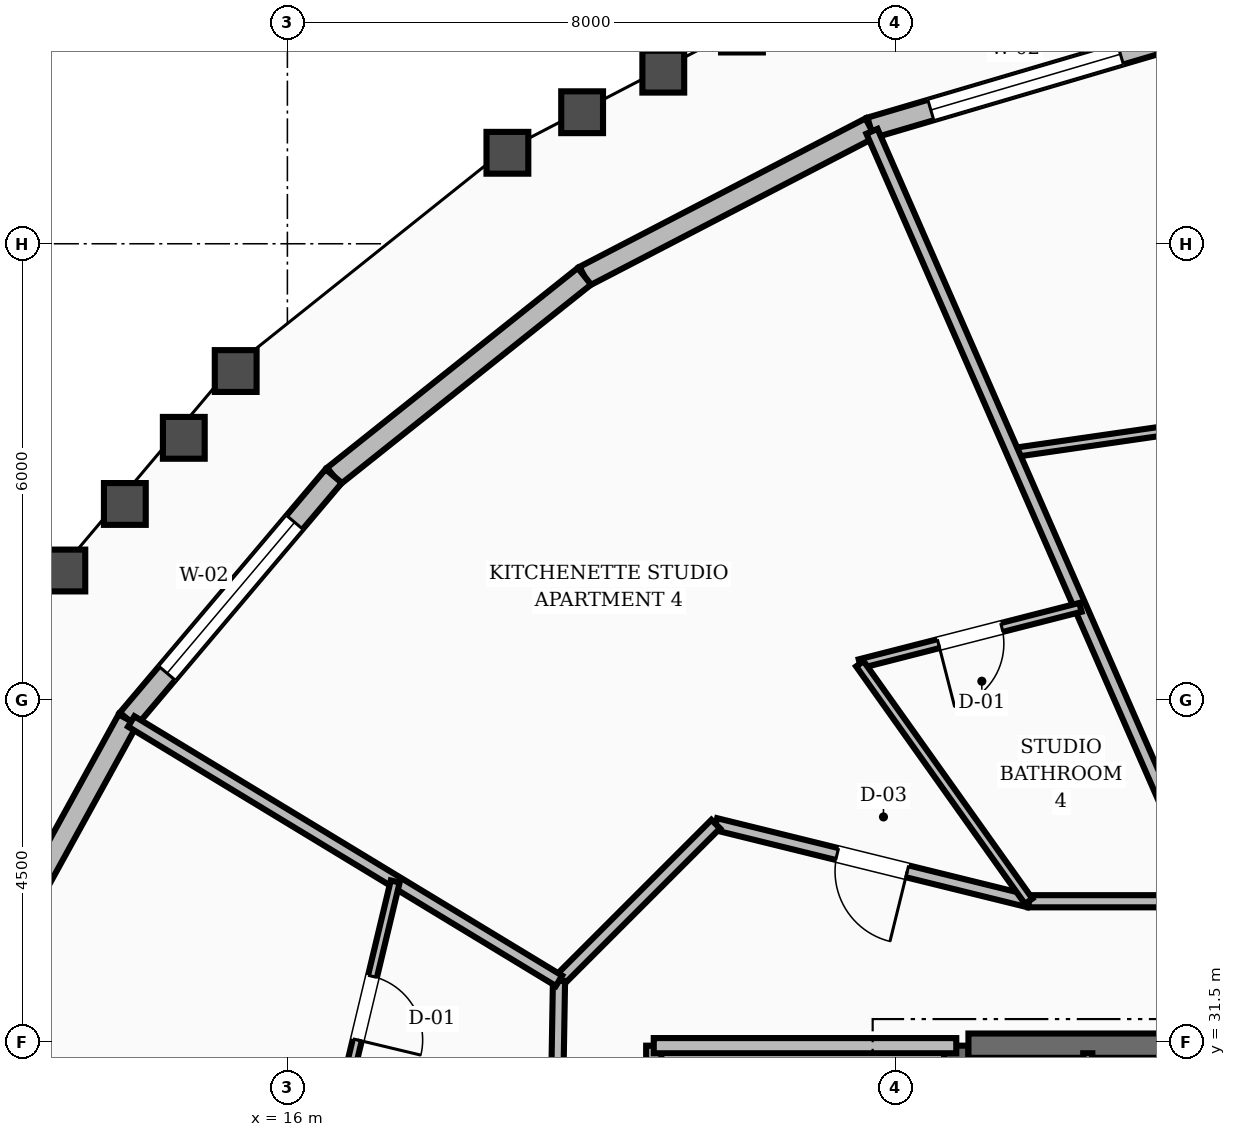
"""IFC4 building model, lengths in metres.
Left out: names, types, materials, properties, quantities, classifications, styles, units other than length and angle.
Written with IfcOpenShell. Run it as: python <this file> out.ifc"""

import sys

from ifc_helpers import new_model, si_unit, direction, frame, frame_2d, origin, place, context, subcontext, project, spatial, rectangle, extrude, element, fill, save


model = new_model("IFC4")
c1 = context("Model", 3, precision=1e-05, world=origin(), true_north=direction((0.0, 1.0)))
c2 = subcontext(c1, "Body", "Model", "MODEL_VIEW")
j1 = project(units=[si_unit("LENGTHUNIT", "METRE"), si_unit("PLANEANGLEUNIT", "RADIAN")], contexts=[c1])
p1 = place(None, origin())
s1 = spatial("IfcSite", under=j1, at=p1, CompositionType="ELEMENT")
p2 = place(p1, origin())
s2 = spatial("IfcBuilding", under=s1, at=p2, CompositionType="ELEMENT")
p3 = place(p2, frame((0.0, 0.0, 240.0)))
s3 = spatial("IfcBuildingStorey", under=s2, at=p3, CompositionType="ELEMENT", Elevation=240.0)
p4 = place(p3, frame((24.8, 25.15, 0.0), z_axis=(0.0, 0.0, 1.0), x_axis=(0.0, 1.0, 0.0)))
e1 = element("IfcWall", 1, at=p4, inside=s3, PredefinedType="SHEAR", context=c2, shape_type="SweptSolid", body=[
    extrude(rectangle(XDim=6.3, YDim=0.32, at=frame_2d((3.15, 0.0))), origin(), (0.0, 0.0, 1.0), 3.6),
])
p5 = place(p3, frame((24.96, 31.45, 0.0), z_axis=(0.0, 0.0, 1.0), x_axis=(1.0, 0.0, 0.0)))
e2 = element("IfcWall", 2, at=p5, inside=s3, PredefinedType="SHEAR", context=c2, shape_type="SweptSolid", body=[
    extrude(rectangle(XDim=3.24, YDim=0.32, at=frame_2d((1.62, 0.0))), origin(), (0.0, 0.0, 1.0), 3.6),
])
p6 = place(p3, frame((27.754, 44.728, 0.0), z_axis=(0.0, 0.0, 1.0), x_axis=(-0.95925857755, -0.28252961154, 0.0)))
e3 = element("IfcWall", 3, at=p6, inside=s3, PredefinedType="STANDARD", context=c2, shape_type="SweptSolid", body=[
    extrude(rectangle(XDim=4.257, YDim=0.28, at=frame_2d((2.128, 0.0))), origin(), (0.0, 0.0, 1.0), 2.88),
])
p7 = place(p6, frame((0.828, 0.0, 0.8)))
e4 = element("IfcOpeningElement", 4, at=p7, cuts=e3, PredefinedType="OPENING", context=c2, shape_type="SweptSolid", body=[
    extrude(rectangle(XDim=2.6, YDim=1.65, at=frame_2d((1.3, 0.825))), frame((0.0, 0.15, 0.0), z_axis=(0.0, -1.0, 0.0), x_axis=(1.0, 0.0, 0.0)), (0.0, 0.0, 1.0), 0.3),
])
p8 = place(p3, frame((23.671, 43.525, 0.0), z_axis=(0.0, 0.0, 1.0), x_axis=(-0.887588000353, -0.460638189504, 0.0)))
e5 = element("IfcWall", 5, at=p8, inside=s3, PredefinedType="STANDARD", context=c2, shape_type="SweptSolid", body=[
    extrude(rectangle(XDim=4.24, YDim=0.28, at=frame_2d((2.12, 0.0))), origin(), (0.0, 0.0, 1.0), 2.88),
])
p9 = place(p3, frame((19.908, 41.572, 0.0), z_axis=(0.0, 0.0, 1.0), x_axis=(-0.782030895384, -0.623239663906, 0.0)))
e6 = element("IfcWall", 6, at=p9, inside=s3, PredefinedType="STANDARD", context=c2, shape_type="SweptSolid", body=[
    extrude(rectangle(XDim=4.217, YDim=0.28, at=frame_2d((2.109, 0.0))), origin(), (0.0, 0.0, 1.0), 2.88),
])
p10 = place(p3, frame((16.61, 38.944, 0.0), z_axis=(0.0, 0.0, 1.0), x_axis=(-0.645568939202, -0.763701999956, 0.0)))
e7 = element("IfcWall", 7, at=p10, inside=s3, PredefinedType="STANDARD", context=c2, shape_type="SweptSolid", body=[
    extrude(rectangle(XDim=4.193, YDim=0.28, at=frame_2d((2.097, 0.0))), origin(), (0.0, 0.0, 1.0), 2.88),
])
p11 = place(p10, frame((0.797, 0.0, 0.8)))
e8 = element("IfcOpeningElement", 8, at=p11, cuts=e7, PredefinedType="OPENING", context=c2, shape_type="SweptSolid", body=[
    extrude(rectangle(XDim=2.6, YDim=1.65, at=frame_2d((1.3, 0.825))), frame((0.0, 0.15, 0.0), z_axis=(0.0, -1.0, 0.0), x_axis=(1.0, 0.0, 0.0)), (0.0, 0.0, 1.0), 0.3),
])
p12 = place(p3, frame((13.903, 35.741, 0.0), z_axis=(0.0, 0.0, 1.0), x_axis=(-0.482219827967, -0.876050248282, 0.0)))
e9 = element("IfcWall", 9, at=p12, inside=s3, PredefinedType="STANDARD", context=c2, shape_type="SweptSolid", body=[
    extrude(rectangle(XDim=4.171, YDim=0.28, at=frame_2d((2.085, 0.0))), origin(), (0.0, 0.0, 1.0), 2.88),
])
p13 = place(p3, frame((20.82, 28.32, 0.0), z_axis=(0.0, 0.0, 1.0), x_axis=(0.0, 1.0, 0.0)))
e10 = element("IfcWall", 10, at=p13, inside=s3, PredefinedType="SOLIDWALL", context=c2, shape_type="SweptSolid", body=[
    extrude(rectangle(XDim=3.13, YDim=0.2, at=frame_2d((1.565, 0.0))), origin(), (0.0, 0.0, 1.0), 2.87),
])
p14 = place(p13, frame((1.09, 0.0, 0.0)))
e11 = element("IfcOpeningElement", 11, at=p14, cuts=e10, PredefinedType="OPENING", context=c2, shape_type="SweptSolid", body=[
    extrude(rectangle(XDim=0.95, YDim=2.1, at=frame_2d((0.475, 1.05))), frame((0.0, 0.11, 0.0), z_axis=(0.0, -1.0, 0.0), x_axis=(1.0, 0.0, 0.0)), (0.0, 0.0, 1.0), 0.22),
])
p15 = place(p3, frame((20.82, 31.45, 0.0), z_axis=(0.0, 0.0, 1.0), x_axis=(1.0, 0.0, 0.0)))
e12 = element("IfcWall", 12, at=p15, inside=s3, PredefinedType="SOLIDWALL", context=c2, shape_type="SweptSolid", body=[
    extrude(rectangle(XDim=3.98, YDim=0.2, at=frame_2d((1.99, 0.0))), origin(), (0.0, 0.0, 1.0), 2.87),
])
p16 = place(p3, frame((26.53, 25.25, 0.0), z_axis=(0.0, 0.0, 1.0), x_axis=(0.0, 1.0, 0.0)))
e13 = element("IfcWall", 13, at=p16, inside=s3, PredefinedType="PARTITIONING", context=c2, shape_type="SweptSolid", body=[
    extrude(rectangle(XDim=6.1, YDim=0.12, at=frame_2d((3.05, 0.0))), origin(), (0.0, 0.0, 1.0), 2.87),
])
p17 = place(p3, frame((28.127, 33.35, 0.0), z_axis=(0.0, 0.0, 1.0), x_axis=(-1.0, 0.0, 0.0)))
e14 = element("IfcWall", 14, at=p17, inside=s3, PredefinedType="SOLIDWALL", context=c2, shape_type="SweptSolid", body=[
    extrude(rectangle(XDim=2.375, YDim=0.16, at=frame_2d((1.188, 0.0))), origin(), (0.0, 0.0, 1.0), 2.87),
])
p18 = place(p3, frame((25.752, 33.35, 0.0), z_axis=(0.0, 0.0, 1.0), x_axis=(-0.970939799552, 0.239323850978, 0.0)))
e15 = element("IfcWall", 15, at=p18, inside=s3, PredefinedType="SOLIDWALL", context=c2, shape_type="SweptSolid", body=[
    extrude(rectangle(XDim=4.241, YDim=0.16, at=frame_2d((2.12, 0.0))), origin(), (0.0, 0.0, 1.0), 2.87),
])
p19 = place(p18, frame((1.646, 0.0, 0.0)))
e16 = element("IfcOpeningElement", 16, at=p19, cuts=e15, PredefinedType="OPENING", context=c2, shape_type="SweptSolid", body=[
    extrude(rectangle(XDim=0.95, YDim=2.1, at=frame_2d((0.475, 1.05))), frame((0.0, 0.09, 0.0), z_axis=(0.0, -1.0, 0.0), x_axis=(1.0, 0.0, 0.0)), (0.0, 0.0, 1.0), 0.18),
])
p20 = place(p3, frame((21.635, 34.365, 0.0), z_axis=(0.0, 0.0, 1.0), x_axis=(-0.707106781187, -0.707106781187, 0.0)))
e17 = element("IfcWall", 17, at=p20, inside=s3, PredefinedType="SOLIDWALL", context=c2, shape_type="SweptSolid", body=[
    extrude(rectangle(XDim=2.916, YDim=0.16, at=frame_2d((1.458, 0.0))), origin(), (0.0, 0.0, 1.0), 2.87),
])
p21 = place(p3, frame((19.573, 32.303, 0.0), z_axis=(0.0, 0.0, 1.0), x_axis=(-0.016981035134, -0.999855811828, 0.0)))
e18 = element("IfcWall", 18, at=p21, inside=s3, PredefinedType="SOLIDWALL", context=c2, shape_type="SweptSolid", body=[
    extrude(rectangle(XDim=3.134, YDim=0.16, at=frame_2d((1.567, 0.0))), origin(), (0.0, 0.0, 1.0), 2.87),
])
p22 = place(p3, frame((32.0, 40.185, 0.0), z_axis=(0.0, 0.0, 1.0), x_axis=(-0.989720707907, -0.143013706829, 0.0)))
e19 = element("IfcWall", 19, at=p22, inside=s3, PredefinedType="PARTITIONING", context=c2, shape_type="SweptSolid", body=[
    extrude(rectangle(XDim=6.525, YDim=0.12, at=frame_2d((3.262, 0.0))), origin(), (0.0, 0.0, 1.0), 2.87),
])
p23 = place(p22, frame((2.787, 0.0, 0.0)))
e20 = element("IfcOpeningElement", 20, at=p23, cuts=e19, PredefinedType="OPENING", context=c2, shape_type="SweptSolid", body=[
    extrude(rectangle(XDim=0.95, YDim=2.1, at=frame_2d((0.475, 1.05))), frame((0.0, 0.07, 0.0), z_axis=(0.0, -1.0, 0.0), x_axis=(1.0, 0.0, 0.0)), (0.0, 0.0, 1.0), 0.14),
])
p24 = place(p3, frame((28.127, 33.35, 0.0), z_axis=(0.0, 0.0, 1.0), x_axis=(-0.401173204802, 0.916002216017, 0.0)))
e21 = element("IfcWall", 21, at=p24, inside=s3, PredefinedType="SOLIDWALL", context=c2, shape_type="SweptSolid", body=[
    extrude(rectangle(XDim=11.058, YDim=0.16, at=frame_2d((5.529, 0.0))), origin(), (0.0, 0.0, 1.0), 2.87),
])
p25 = place(p3, frame((26.434, 37.217, 0.0), z_axis=(0.0, 0.0, 1.0), x_axis=(-0.968819540563, -0.247767426879, 0.0)))
e22 = element("IfcWall", 22, at=p25, inside=s3, PredefinedType="PARTITIONING", context=c2, shape_type="SweptSolid", body=[
    extrude(rectangle(XDim=2.996, YDim=0.12, at=frame_2d((1.498, 0.0))), origin(), (0.0, 0.0, 1.0), 2.87),
])
p26 = place(p25, frame((1.068, 0.0, 0.0)))
e23 = element("IfcOpeningElement", 23, at=p26, cuts=e22, PredefinedType="OPENING", context=c2, shape_type="SweptSolid", body=[
    extrude(rectangle(XDim=0.86, YDim=2.1, at=frame_2d((0.43, 1.05))), frame((0.0, 0.07, 0.0), z_axis=(0.0, -1.0, 0.0), x_axis=(1.0, 0.0, 0.0)), (0.0, 0.0, 1.0), 0.14),
])
p27 = place(p3, frame((25.752, 33.35, 0.0), z_axis=(0.0, 0.0, 1.0), x_axis=(-0.579393118197, 0.81504822838, 0.0)))
e24 = element("IfcWall", 24, at=p27, inside=s3, PredefinedType="PARTITIONING", context=c2, shape_type="SweptSolid", body=[
    extrude(rectangle(XDim=3.833, YDim=0.12, at=frame_2d((1.917, 0.0))), origin(), (0.0, 0.0, 1.0), 2.87),
])
p28 = place(p3, frame((19.573, 32.303, 0.0), z_axis=(0.0, 0.0, 1.0), x_axis=(-0.855087696753, 0.518483394973, 0.0)))
e25 = element("IfcWall", 25, at=p28, inside=s3, PredefinedType="SOLIDWALL", context=c2, shape_type="SweptSolid", body=[
    extrude(rectangle(XDim=6.581, YDim=0.16, at=frame_2d((3.291, 0.0))), origin(), (0.0, 0.0, 1.0), 2.87),
])
p29 = place(p3, frame((17.418, 33.61, 0.0), z_axis=(0.0, 0.0, 1.0), x_axis=(-0.232763726017, -0.97253331452, 0.0)))
e26 = element("IfcWall", 26, at=p29, inside=s3, PredefinedType="PARTITIONING", context=c2, shape_type="SweptSolid", body=[
    extrude(rectangle(XDim=3.426, YDim=0.12, at=frame_2d((1.713, 0.0))), origin(), (0.0, 0.0, 1.0), 2.87),
])
p30 = place(p29, frame((1.283, 0.0, 0.0)))
e27 = element("IfcOpeningElement", 27, at=p30, cuts=e26, PredefinedType="OPENING", context=c2, shape_type="SweptSolid", body=[
    extrude(rectangle(XDim=0.86, YDim=2.1, at=frame_2d((0.43, 1.05))), frame((0.0, 0.07, 0.0), z_axis=(0.0, -1.0, 0.0), x_axis=(1.0, 0.0, 0.0)), (0.0, 0.0, 1.0), 0.14),
])
p31 = place(p7, origin())
e28 = element("IfcWindow", 28, at=p31, inside=s3, PartitioningType="SINGLE_PANEL", PredefinedType="WINDOW", context=c2, shape_type="SweptSolid", body=[
    extrude(rectangle(XDim=2.6, YDim=1.65, at=frame_2d((1.3, 0.825))), frame((0.0, 0.03, 0.0), z_axis=(0.0, -1.0, 0.0), x_axis=(1.0, 0.0, 0.0)), (0.0, 0.0, 1.0), 0.06),
])
fill(e4, e28)
p32 = place(p11, origin())
e29 = element("IfcWindow", 29, at=p32, inside=s3, PartitioningType="SINGLE_PANEL", PredefinedType="WINDOW", context=c2, shape_type="SweptSolid", body=[
    extrude(rectangle(XDim=2.6, YDim=1.65, at=frame_2d((1.3, 0.825))), frame((0.0, 0.03, 0.0), z_axis=(0.0, -1.0, 0.0), x_axis=(1.0, 0.0, 0.0)), (0.0, 0.0, 1.0), 0.06),
])
fill(e8, e29)
p33 = place(p26, origin())
e30 = element("IfcDoor", 30, at=p33, inside=s3, OperationType="SINGLE_SWING_RIGHT", PredefinedType="DOOR", context=c2, shape_type="SweptSolid", body=[
    extrude(rectangle(XDim=0.86, YDim=2.1, at=frame_2d((0.43, 1.05))), frame((0.0, 0.025, 0.0), z_axis=(0.0, -1.0, 0.0), x_axis=(1.0, 0.0, 0.0)), (0.0, 0.0, 1.0), 0.05),
])
fill(e23, e30)
p34 = place(p19, origin())
e31 = element("IfcDoor", 31, at=p34, inside=s3, OperationType="SINGLE_SWING_LEFT", PredefinedType="DOOR", context=c2, shape_type="SweptSolid", body=[
    extrude(rectangle(XDim=0.95, YDim=2.1, at=frame_2d((0.475, 1.05))), frame((0.0, 0.025, 0.0), z_axis=(0.0, -1.0, 0.0), x_axis=(1.0, 0.0, 0.0)), (0.0, 0.0, 1.0), 0.05),
])
fill(e16, e31)
p35 = place(p30, origin())
e32 = element("IfcDoor", 32, at=p35, inside=s3, OperationType="SINGLE_SWING_RIGHT", PredefinedType="DOOR", context=c2, shape_type="SweptSolid", body=[
    extrude(rectangle(XDim=0.86, YDim=2.1, at=frame_2d((0.43, 1.05))), frame((0.0, 0.025, 0.0), z_axis=(0.0, -1.0, 0.0), x_axis=(1.0, 0.0, 0.0)), (0.0, 0.0, 1.0), 0.05),
])
fill(e27, e32)
save(model, sys.argv[1])
